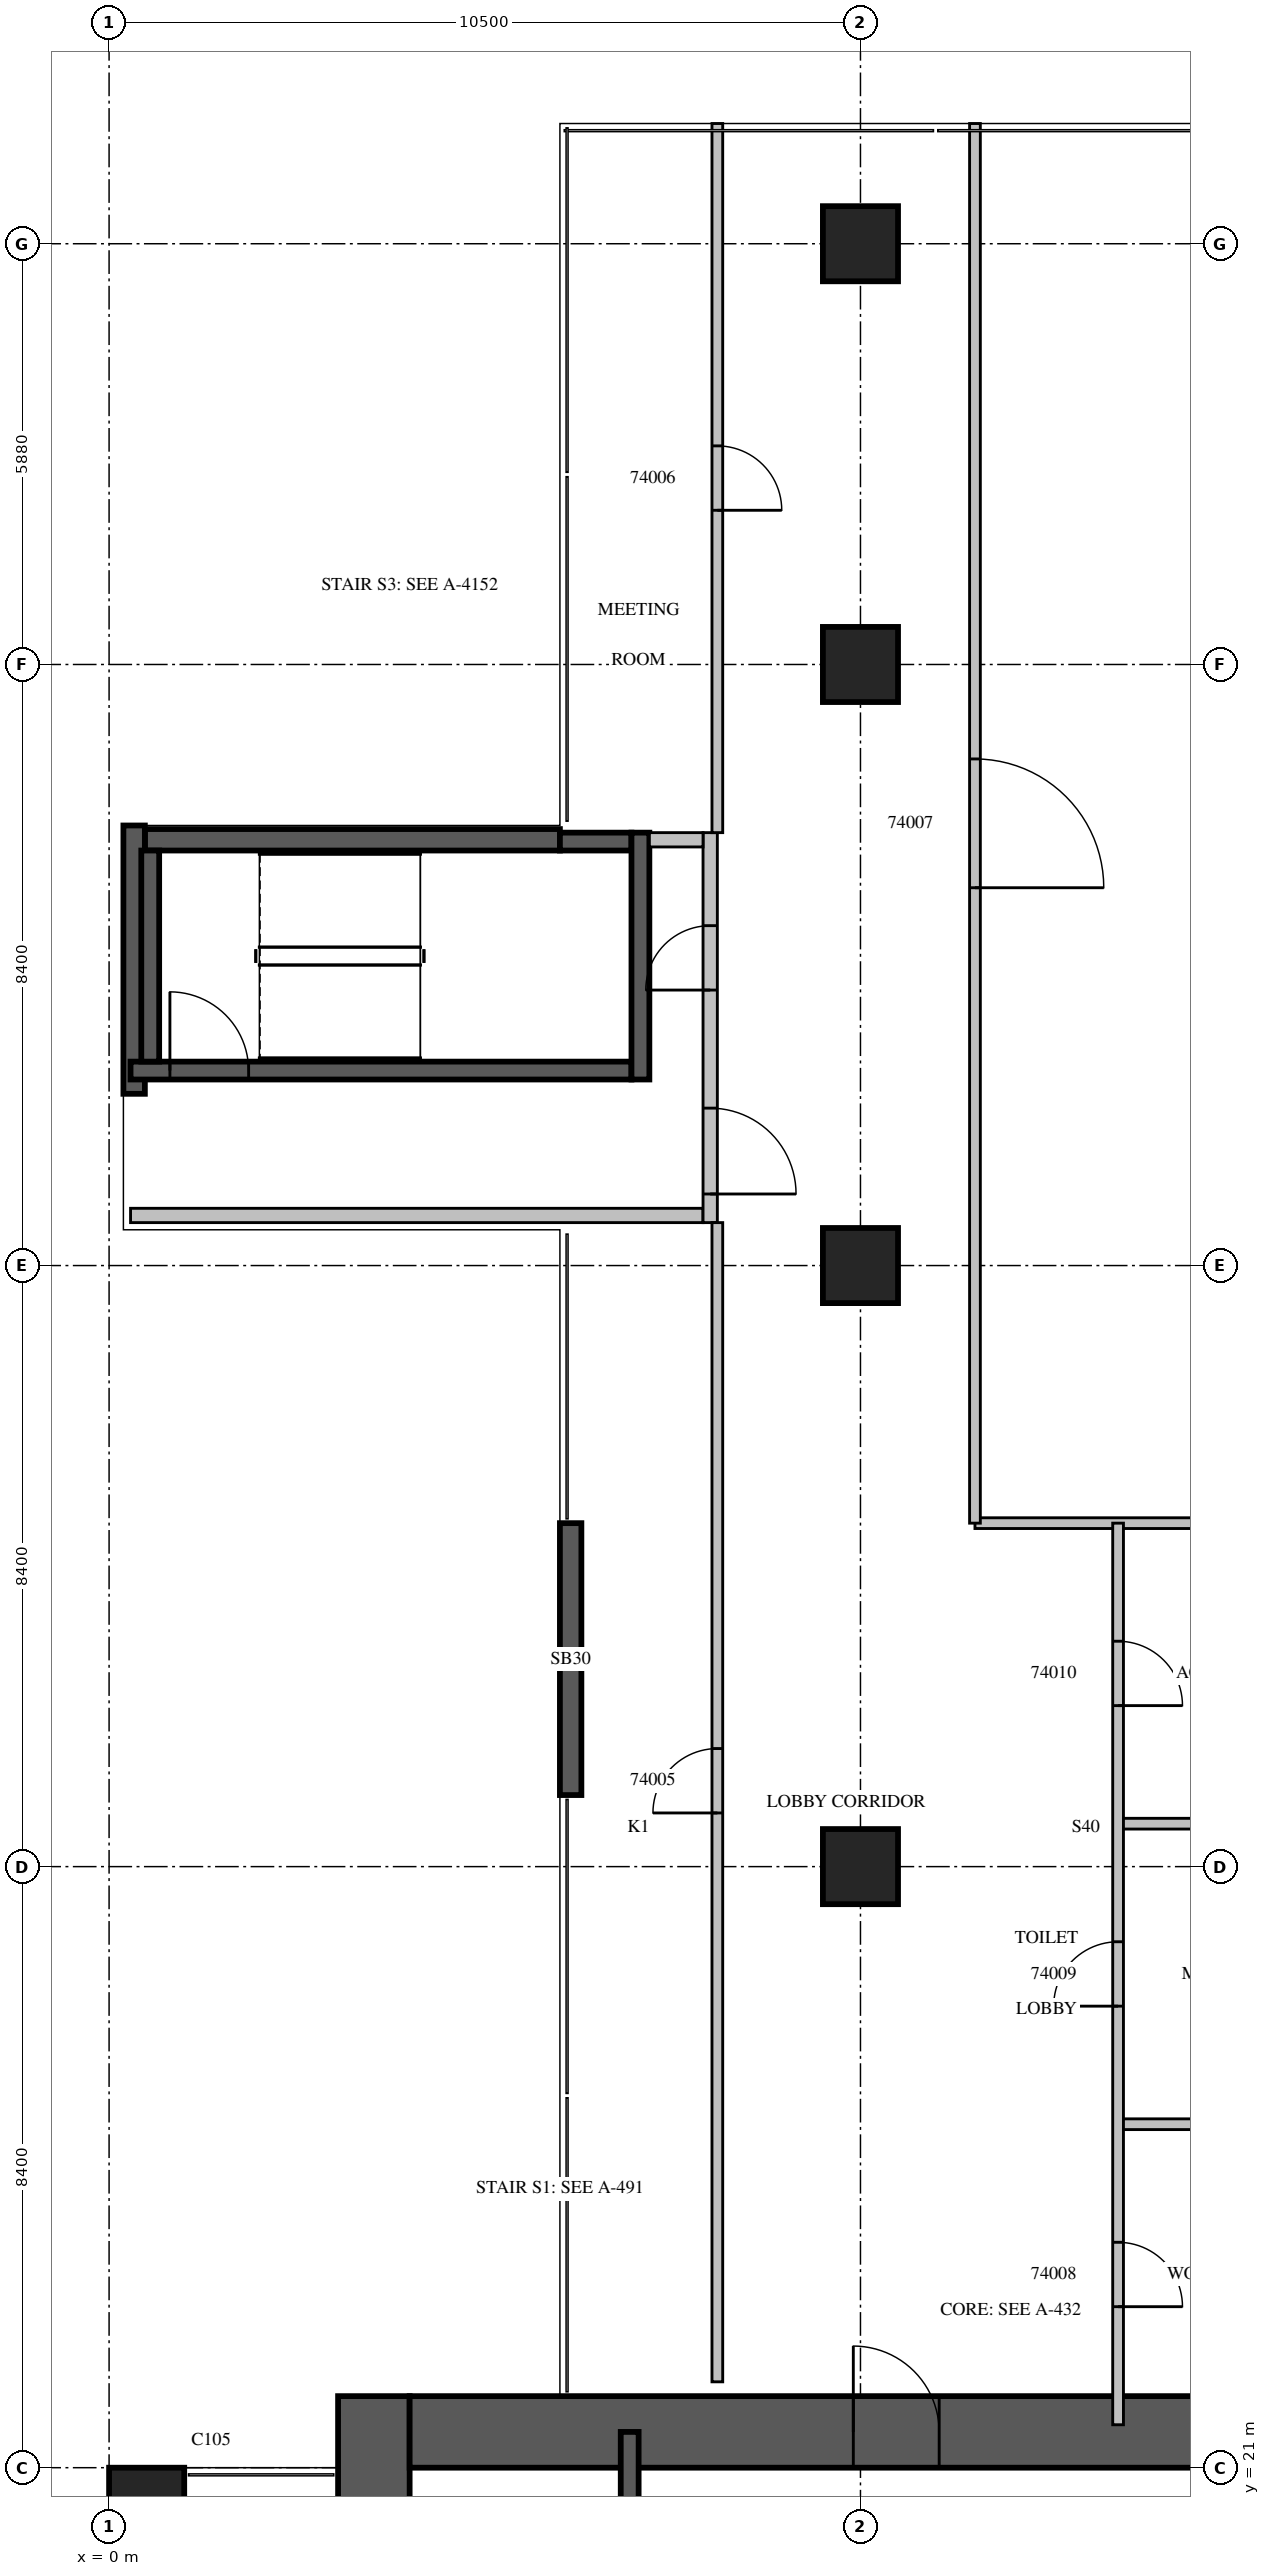
"""IFC4 building model, lengths in metres.
Left out: names, types, materials, properties, quantities, classifications, styles, units other than length and angle.
Written with IfcOpenShell. Run it as: python <this file> out.ifc"""

import sys

from ifc_helpers import new_model, si_unit, direction, frame, frame_2d, origin, origin_2d, place, context, subcontext, project, spatial, rectangle, extrude, source, transform, mapped, element, fill, save


model = new_model("IFC4")
c1 = context("Model", 3, precision=1e-05, world=origin(), true_north=direction((0.0, 1.0)))
c2 = subcontext(c1, "Body", "Model", "MODEL_VIEW")
j1 = project(units=[si_unit("LENGTHUNIT", "METRE"), si_unit("PLANEANGLEUNIT", "RADIAN")], contexts=[c1])
p1 = place(None, origin())
s1 = spatial("IfcSite", under=j1, at=p1, CompositionType="ELEMENT")
p2 = place(p1, origin())
s2 = spatial("IfcBuilding", under=s1, at=p2, CompositionType="ELEMENT")
p3 = place(p2, frame((0.0, 0.0, 170.3)))
s3 = spatial("IfcBuildingStorey", under=s2, at=p3, CompositionType="ELEMENT", Elevation=170.3)
m1 = source(origin(), c2, "Body", "SweptSolid", [
    extrude(rectangle(XDim=1.05, YDim=1.05, at=origin_2d()), origin(), (0.0, 0.0, 1.0), 7.5),
])
for number, where, z_axis, x_axis in (
    (1, (0.525, 20.475, 0.0), (0.0, 0.0, 1.0), (1.0, 0.0, 0.0)),
    (2, (10.5, 29.4, 0.0), (0.0, 0.0, 1.0), (1.0, 0.0, 0.0)),
    (3, (10.5, 37.8, 0.0), (0.0, 0.0, 1.0), (1.0, 0.0, 0.0)),
    (4, (10.5, 46.2, 0.0), (0.0, 0.0, 1.0), (1.0, 0.0, 0.0)),
    (5, (10.5, 52.08, 0.0), (0.0, 0.0, 1.0), (1.0, 0.0, 0.0)),
):
    element("IfcColumn", number, at=place(p3, frame(where, z_axis=z_axis, x_axis=x_axis)), inside=s3, PredefinedType="COLUMN", context=c2, shape_type="MappedRepresentation", body=[
        mapped(m1, transform((0.0, 0.0, 0.0), scale=1.0)),
    ])
p4 = place(p3, frame((3.7, 4.2, 0.0), z_axis=(0.0, 0.0, 1.0), x_axis=(0.0, 1.0, 0.0)))
e6 = element("IfcWall", 6, at=p4, inside=s3, PredefinedType="SHEAR", context=c2, shape_type="SweptSolid", body=[
    extrude(rectangle(XDim=17.8, YDim=1.0, at=frame_2d((8.9, 0.0))), origin(), (0.0, 0.0, 1.0), 7.5),
])
m2 = source(origin(), c2, "Body", "SweptSolid", [
    extrude(rectangle(XDim=2.2, YDim=2.1, at=frame_2d((1.1, 1.05))), frame((0.0, 0.51, 0.0), z_axis=(0.0, -1.0, 0.0), x_axis=(1.0, 0.0, 0.0)), (0.0, 0.0, 1.0), 1.02),
])
p5 = place(p4, frame((4.2, 0.0, 0.0)))
e7 = element("IfcOpeningElement", 7, at=p5, cuts=e6, PredefinedType="OPENING", context=c2, shape_type="MappedRepresentation", body=[
    mapped(m2, transform((0.0, 0.0, 0.0), scale=1.0)),
])
m3 = source(origin(), c2, "Body", "SweptSolid", [
    extrude(rectangle(XDim=16.8, YDim=1.0, at=frame_2d((8.4, 0.0))), origin(), (0.0, 0.0, 1.0), 7.5),
])
p6 = place(p3, frame((4.2, 21.5, 0.0), z_axis=(0.0, 0.0, 1.0), x_axis=(1.0, 0.0, 0.0)))
e8 = element("IfcWall", 8, at=p6, inside=s3, PredefinedType="SHEAR", context=c2, shape_type="MappedRepresentation", body=[
    mapped(m3, transform((0.0, 0.0, 0.0), scale=1.0)),
])
m4 = source(origin(), c2, "Body", "SweptSolid", [
    extrude(rectangle(XDim=1.2, YDim=2.1, at=frame_2d((0.6, 1.05))), frame((0.0, 0.51, 0.0), z_axis=(0.0, -1.0, 0.0), x_axis=(1.0, 0.0, 0.0)), (0.0, 0.0, 1.0), 1.02),
])
p7 = place(p6, frame((6.2, 0.0, 0.0)))
e9 = element("IfcOpeningElement", 9, at=p7, cuts=e8, PredefinedType="OPENING", context=c2, shape_type="MappedRepresentation", body=[
    mapped(m4, transform((0.0, 0.0, 0.0), scale=1.0)),
])
p8 = place(p3, frame((6.3, 43.75, 0.0), z_axis=(0.0, 0.0, 1.0), x_axis=(-1.0, 0.0, 0.0)))
e10 = element("IfcWall", 10, at=p8, inside=s3, PredefinedType="SOLIDWALL", context=c2, shape_type="SweptSolid", body=[
    extrude(rectangle(XDim=5.8, YDim=0.3, at=frame_2d((2.9, 0.0))), origin(), (0.0, 0.0, 1.0), 7.1),
])
p9 = place(p3, frame((0.35, 43.95, 0.0), z_axis=(0.0, 0.0, 1.0), x_axis=(0.0, -1.0, 0.0)))
e11 = element("IfcWall", 11, at=p9, inside=s3, PredefinedType="SOLIDWALL", context=c2, shape_type="SweptSolid", body=[
    extrude(rectangle(XDim=3.75, YDim=0.3, at=frame_2d((1.875, 0.0))), origin(), (0.0, 0.0, 1.0), 7.1),
])
p10 = place(p3, frame((6.45, 34.2, 0.0), z_axis=(0.0, 0.0, 1.0), x_axis=(0.0, -1.0, 0.0)))
e12 = element("IfcWall", 12, at=p10, inside=s3, PredefinedType="SOLIDWALL", context=c2, shape_type="SweptSolid", body=[
    extrude(rectangle(XDim=3.8, YDim=0.3, at=frame_2d((1.9, 0.0))), origin(), (0.0, 0.0, 1.0), 7.1),
])
p11 = place(p3, frame((7.275, 14.9, 0.0), z_axis=(0.0, 0.0, 1.0), x_axis=(0.0, 1.0, 0.0)))
e13 = element("IfcWall", 13, at=p11, inside=s3, PredefinedType="SOLIDWALL", context=c2, shape_type="SweptSolid", body=[
    extrude(rectangle(XDim=6.6, YDim=0.25, at=frame_2d((3.3, 0.0))), origin(), (0.0, 0.0, 1.0), 7.1),
])
m5 = source(origin(), c2, "Body", "SweptSolid", [
    extrude(rectangle(XDim=1.1, YDim=2.1, at=frame_2d((0.55, 1.05))), frame((0.0, 0.135, 0.0), z_axis=(0.0, -1.0, 0.0), x_axis=(1.0, 0.0, 0.0)), (0.0, 0.0, 1.0), 0.27),
])
p12 = place(p11, frame((0.15, 0.0, 0.0)))
e14 = element("IfcOpeningElement", 14, at=p12, cuts=e13, PredefinedType="OPENING", context=c2, shape_type="MappedRepresentation", body=[
    mapped(m5, transform((0.0, 0.0, 0.0), scale=1.0)),
])
m6 = source(origin(), c2, "Body", "SweptSolid", [
    extrude(rectangle(XDim=7.0, YDim=0.25, at=frame_2d((3.5, 0.0))), origin(), (0.0, 0.0, 1.0), 7.1),
])
p13 = place(p3, frame((0.3, 40.525, 0.0), z_axis=(0.0, 0.0, 1.0), x_axis=(1.0, 0.0, 0.0)))
e15 = element("IfcWall", 15, at=p13, inside=s3, PredefinedType="SOLIDWALL", context=c2, shape_type="MappedRepresentation", body=[
    mapped(m6, transform((0.0, 0.0, 0.0), scale=1.0)),
])
p14 = place(p13, frame((0.55, 0.0, 0.0)))
e16 = element("IfcOpeningElement", 16, at=p14, cuts=e15, PredefinedType="OPENING", context=c2, shape_type="MappedRepresentation", body=[
    mapped(m5, transform((0.0, 0.0, 0.0), scale=1.0)),
])
p15 = place(p3, frame((6.3, 43.725, 0.0), z_axis=(0.0, 0.0, 1.0), x_axis=(1.0, 0.0, 0.0)))
e17 = element("IfcWall", 17, at=p15, inside=s3, PredefinedType="SOLIDWALL", context=c2, shape_type="SweptSolid", body=[
    extrude(rectangle(XDim=1.0, YDim=0.25, at=frame_2d((0.5, 0.0))), origin(), (0.0, 0.0, 1.0), 7.1),
])
m7 = source(origin(), c2, "Body", "SweptSolid", [
    extrude(rectangle(XDim=3.45, YDim=0.25, at=frame_2d((1.725, 0.0))), origin(), (0.0, 0.0, 1.0), 7.1),
])
p16 = place(p3, frame((7.425, 40.4, 0.0), z_axis=(0.0, 0.0, 1.0), x_axis=(0.0, 1.0, 0.0)))
e18 = element("IfcWall", 18, at=p16, inside=s3, PredefinedType="SOLIDWALL", context=c2, shape_type="MappedRepresentation", body=[
    mapped(m7, transform((0.0, 0.0, 0.0), scale=1.0)),
])
m8 = source(origin(), c2, "Body", "SweptSolid", [
    extrude(rectangle(XDim=2.95, YDim=0.25, at=frame_2d((1.475, 0.0))), origin(), (0.0, 0.0, 1.0), 7.1),
])
p17 = place(p3, frame((0.575, 40.65, 0.0), z_axis=(0.0, 0.0, 1.0), x_axis=(0.0, 1.0, 0.0)))
e19 = element("IfcWall", 19, at=p17, inside=s3, PredefinedType="SOLIDWALL", context=c2, shape_type="MappedRepresentation", body=[
    mapped(m8, transform((0.0, 0.0, 0.0), scale=1.0)),
])
m9 = source(origin(), c2, "Body", "SweptSolid", [
    extrude(rectangle(XDim=8.0, YDim=0.2, at=frame_2d((4.0, 0.0))), origin(), (0.0, 0.0, 1.0), 7.1),
])
p18 = place(p3, frame((0.3, 38.5, 0.0), z_axis=(0.0, 0.0, 1.0), x_axis=(1.0, 0.0, 0.0)))
e20 = element("IfcWall", 20, at=p18, inside=s3, PredefinedType="PARTITIONING", context=c2, shape_type="MappedRepresentation", body=[
    mapped(m9, transform((0.0, 0.0, 0.0), scale=1.0)),
])
m10 = source(origin(), c2, "Body", "SweptSolid", [
    extrude(rectangle(XDim=5.45, YDim=0.2, at=frame_2d((2.725, 0.0))), origin(), (0.0, 0.0, 1.0), 7.1),
])
p19 = place(p3, frame((8.4, 38.4, 0.0), z_axis=(0.0, 0.0, 1.0), x_axis=(0.0, 1.0, 0.0)))
e21 = element("IfcWall", 21, at=p19, inside=s3, PredefinedType="PARTITIONING", context=c2, shape_type="MappedRepresentation", body=[
    mapped(m10, transform((0.0, 0.0, 0.0), scale=1.0)),
])
m11 = source(origin(), c2, "Body", "SweptSolid", [
    extrude(rectangle(XDim=1.2, YDim=2.1, at=frame_2d((0.6, 1.05))), frame((0.0, 0.11, 0.0), z_axis=(0.0, -1.0, 0.0), x_axis=(1.0, 0.0, 0.0)), (0.0, 0.0, 1.0), 0.22),
])
p20 = place(p19, frame((0.4, 0.0, 0.0)))
e22 = element("IfcOpeningElement", 22, at=p20, cuts=e21, PredefinedType="OPENING", context=c2, shape_type="MappedRepresentation", body=[
    mapped(m11, transform((0.0, 0.0, 0.0), scale=1.0)),
])
m12 = source(origin(), c2, "Body", "SweptSolid", [
    extrude(rectangle(XDim=0.9, YDim=2.1, at=frame_2d((0.45, 1.05))), frame((0.0, 0.11, 0.0), z_axis=(0.0, -1.0, 0.0), x_axis=(1.0, 0.0, 0.0)), (0.0, 0.0, 1.0), 0.22),
])
p21 = place(p19, frame((3.25, 0.0, 0.0)))
e23 = element("IfcOpeningElement", 23, at=p21, cuts=e21, PredefinedType="OPENING", context=c2, shape_type="MappedRepresentation", body=[
    mapped(m12, transform((0.0, 0.0, 0.0), scale=1.0)),
])
m13 = source(origin(), c2, "Body", "SweptSolid", [
    extrude(rectangle(XDim=0.75, YDim=0.2, at=frame_2d((0.375, 0.0))), origin(), (0.0, 0.0, 1.0), 7.1),
])
p22 = place(p3, frame((7.55, 43.75, 0.0), z_axis=(0.0, 0.0, 1.0), x_axis=(1.0, 0.0, 0.0)))
e24 = element("IfcWall", 24, at=p22, inside=s3, PredefinedType="PARTITIONING", context=c2, shape_type="MappedRepresentation", body=[
    mapped(m13, transform((0.0, 0.0, 0.0), scale=1.0)),
])
p23 = place(p3, frame((14.1, 25.8, 0.0), z_axis=(0.0, 0.0, 1.0), x_axis=(1.0, 0.0, 0.0)))
e25 = element("IfcWall", 25, at=p23, inside=s3, PredefinedType="PARTITIONING", context=c2, shape_type="SweptSolid", body=[
    extrude(rectangle(XDim=3.0, YDim=0.15, at=frame_2d((1.5, 0.0))), origin(), (0.0, 0.0, 1.0), 7.1),
])
m14 = source(origin(), c2, "Body", "SweptSolid", [
    extrude(rectangle(XDim=3.0, YDim=0.15, at=frame_2d((1.5, 0.0))), origin(), (0.0, 0.0, 1.0), 7.1),
])
p24 = place(p3, frame((14.1, 30.0, 0.0), z_axis=(0.0, 0.0, 1.0), x_axis=(1.0, 0.0, 0.0)))
e26 = element("IfcWall", 26, at=p24, inside=s3, PredefinedType="PARTITIONING", context=c2, shape_type="MappedRepresentation", body=[
    mapped(m14, transform((0.0, 0.0, 0.0), scale=1.0)),
])
p25 = place(p3, frame((12.1, 34.2, 0.0), z_axis=(0.0, 0.0, 1.0), x_axis=(1.0, 0.0, 0.0)))
e27 = element("IfcWall", 27, at=p25, inside=s3, PredefinedType="PARTITIONING", context=c2, shape_type="SweptSolid", body=[
    extrude(rectangle(XDim=5.0, YDim=0.15, at=frame_2d((2.5, 0.0))), origin(), (0.0, 0.0, 1.0), 7.1),
])
m15 = source(origin(), c2, "Body", "SweptSolid", [
    extrude(rectangle(XDim=16.2, YDim=0.15, at=frame_2d((8.1, 0.0))), origin(), (0.0, 0.0, 1.0), 7.1),
])
p26 = place(p3, frame((8.5, 22.2, 0.0), z_axis=(0.0, 0.0, 1.0), x_axis=(0.0, 1.0, 0.0)))
e28 = element("IfcWall", 28, at=p26, inside=s3, PredefinedType="PARTITIONING", context=c2, shape_type="MappedRepresentation", body=[
    mapped(m15, transform((0.0, 0.0, 0.0), scale=1.0)),
])
m16 = source(origin(), c2, "Body", "SweptSolid", [
    extrude(rectangle(XDim=0.9, YDim=2.1, at=frame_2d((0.45, 1.05))), frame((0.0, 0.085, 0.0), z_axis=(0.0, -1.0, 0.0), x_axis=(1.0, 0.0, 0.0)), (0.0, 0.0, 1.0), 0.17),
])
p27 = place(p26, frame((7.95, 0.0, 0.0)))
e29 = element("IfcOpeningElement", 29, at=p27, cuts=e28, PredefinedType="OPENING", context=c2, shape_type="MappedRepresentation", body=[
    mapped(m16, transform((0.0, 0.0, 0.0), scale=1.0)),
])
p28 = place(p3, frame((8.5, 43.85, 0.0), z_axis=(0.0, 0.0, 1.0), x_axis=(0.0, 1.0, 0.0)))
e30 = element("IfcWall", 30, at=p28, inside=s3, PredefinedType="PARTITIONING", context=c2, shape_type="SweptSolid", body=[
    extrude(rectangle(XDim=9.91, YDim=0.15, at=frame_2d((4.955, 0.0))), origin(), (0.0, 0.0, 1.0), 7.1),
])
p29 = place(p28, frame((4.505, 0.0, 0.0)))
e31 = element("IfcOpeningElement", 31, at=p29, cuts=e30, PredefinedType="OPENING", context=c2, shape_type="MappedRepresentation", body=[
    mapped(m16, transform((0.0, 0.0, 0.0), scale=1.0)),
])
p30 = place(p3, frame((12.1, 34.2, 0.0), z_axis=(0.0, 0.0, 1.0), x_axis=(0.0, 1.0, 0.0)))
e32 = element("IfcWall", 32, at=p30, inside=s3, PredefinedType="PARTITIONING", context=c2, shape_type="SweptSolid", body=[
    extrude(rectangle(XDim=19.56, YDim=0.15, at=frame_2d((9.78, 0.0))), origin(), (0.0, 0.0, 1.0), 7.1),
])
m17 = source(origin(), c2, "Body", "SweptSolid", [
    extrude(rectangle(XDim=1.8, YDim=2.1, at=frame_2d((0.9, 1.05))), frame((0.0, 0.085, 0.0), z_axis=(0.0, -1.0, 0.0), x_axis=(1.0, 0.0, 0.0)), (0.0, 0.0, 1.0), 0.17),
])
p31 = place(p30, frame((8.88, 0.0, 0.0)))
e33 = element("IfcOpeningElement", 33, at=p31, cuts=e32, PredefinedType="OPENING", context=c2, shape_type="MappedRepresentation", body=[
    mapped(m17, transform((0.0, 0.0, 0.0), scale=1.0)),
])
p32 = place(p3, frame((14.1, 21.6, 0.0), z_axis=(0.0, 0.0, 1.0), x_axis=(0.0, 1.0, 0.0)))
e34 = element("IfcWall", 34, at=p32, inside=s3, PredefinedType="PARTITIONING", context=c2, shape_type="SweptSolid", body=[
    extrude(rectangle(XDim=12.6, YDim=0.15, at=frame_2d((6.3, 0.0))), origin(), (0.0, 0.0, 1.0), 7.1),
])
p33 = place(p32, frame((1.65, 0.0, 0.0)))
e35 = element("IfcOpeningElement", 35, at=p33, cuts=e34, PredefinedType="OPENING", context=c2, shape_type="MappedRepresentation", body=[
    mapped(m16, transform((0.0, 0.0, 0.0), scale=1.0)),
])
p34 = place(p32, frame((5.85, 0.0, 0.0)))
e36 = element("IfcOpeningElement", 36, at=p34, cuts=e34, PredefinedType="OPENING", context=c2, shape_type="MappedRepresentation", body=[
    mapped(m16, transform((0.0, 0.0, 0.0), scale=1.0)),
])
p35 = place(p32, frame((10.05, 0.0, 0.0)))
e37 = element("IfcOpeningElement", 37, at=p35, cuts=e34, PredefinedType="OPENING", context=c2, shape_type="MappedRepresentation", body=[
    mapped(m16, transform((0.0, 0.0, 0.0), scale=1.0)),
])
m18 = source(origin(), c2, "Body", "SweptSolid", [
    extrude(rectangle(XDim=1.1, YDim=2.1, at=frame_2d((0.55, 1.05))), frame((0.0, 0.025, 0.0), z_axis=(0.0, -1.0, 0.0), x_axis=(1.0, 0.0, 0.0)), (0.0, 0.0, 1.0), 0.05),
])
p36 = place(p14, origin())
e38 = element("IfcDoor", 38, at=p36, inside=s3, OperationType="SINGLE_SWING_LEFT", PredefinedType="DOOR", context=c2, shape_type="MappedRepresentation", body=[
    mapped(m18, transform((0.0, 0.0, 0.0), scale=1.0)),
])
fill(e16, e38)
m19 = source(origin(), c2, "Body", "SweptSolid", [
    extrude(rectangle(XDim=1.2, YDim=2.1, at=frame_2d((0.6, 1.05))), frame((0.0, 0.025, 0.0), z_axis=(0.0, -1.0, 0.0), x_axis=(1.0, 0.0, 0.0)), (0.0, 0.0, 1.0), 0.05),
])
p37 = place(p20, origin())
e39 = element("IfcDoor", 39, at=p37, inside=s3, OperationType="SINGLE_SWING_RIGHT", PredefinedType="DOOR", context=c2, shape_type="MappedRepresentation", body=[
    mapped(m19, transform((0.0, 0.0, 0.0), scale=1.0)),
])
fill(e22, e39)
m20 = source(origin(), c2, "Body", "SweptSolid", [
    extrude(rectangle(XDim=0.9, YDim=2.1, at=frame_2d((0.45, 1.05))), frame((0.0, 0.025, 0.0), z_axis=(0.0, -1.0, 0.0), x_axis=(1.0, 0.0, 0.0)), (0.0, 0.0, 1.0), 0.05),
])
p38 = place(p21, origin())
e40 = element("IfcDoor", 40, at=p38, inside=s3, OperationType="SINGLE_SWING_LEFT", PredefinedType="DOOR", context=c2, shape_type="MappedRepresentation", body=[
    mapped(m20, transform((0.0, 0.0, 0.0), scale=1.0)),
])
fill(e23, e40)
p39 = place(p7, origin())
e41 = element("IfcDoor", 41, at=p39, inside=s3, OperationType="SINGLE_SWING_LEFT", PredefinedType="DOOR", context=c2, shape_type="MappedRepresentation", body=[
    mapped(m19, transform((0.0, 0.0, 0.0), scale=1.0)),
])
fill(e9, e41)
p40 = place(p27, origin())
e42 = element("IfcDoor", 42, at=p40, inside=s3, OperationType="SINGLE_SWING_LEFT", PredefinedType="DOOR", context=c2, shape_type="MappedRepresentation", body=[
    mapped(m20, transform((0.0, 0.0, 0.0), scale=1.0)),
])
fill(e29, e42)
p41 = place(p29, origin())
e43 = element("IfcDoor", 43, at=p41, inside=s3, OperationType="SINGLE_SWING_RIGHT", PredefinedType="DOOR", context=c2, shape_type="MappedRepresentation", body=[
    mapped(m20, transform((0.0, 0.0, 0.0), scale=1.0)),
])
fill(e31, e43)
m21 = source(origin(), c2, "Body", "SweptSolid", [
    extrude(rectangle(XDim=1.8, YDim=2.1, at=frame_2d((0.9, 1.05))), frame((0.0, 0.025, 0.0), z_axis=(0.0, -1.0, 0.0), x_axis=(1.0, 0.0, 0.0)), (0.0, 0.0, 1.0), 0.05),
])
p42 = place(p31, origin())
e44 = element("IfcDoor", 44, at=p42, inside=s3, OperationType="DOUBLE_DOOR_SINGLE_SWING", PredefinedType="DOOR", context=c2, shape_type="MappedRepresentation", body=[
    mapped(m21, transform((0.0, 0.0, 0.0), scale=1.0)),
])
fill(e33, e44)
p43 = place(p33, origin())
e45 = element("IfcDoor", 45, at=p43, inside=s3, OperationType="SINGLE_SWING_RIGHT", PredefinedType="DOOR", context=c2, shape_type="MappedRepresentation", body=[
    mapped(m20, transform((0.0, 0.0, 0.0), scale=1.0)),
])
fill(e35, e45)
p44 = place(p34, origin())
e46 = element("IfcDoor", 46, at=p44, inside=s3, OperationType="SINGLE_SWING_LEFT", PredefinedType="DOOR", context=c2, shape_type="MappedRepresentation", body=[
    mapped(m20, transform((0.0, 0.0, 0.0), scale=1.0)),
])
fill(e36, e46)
p45 = place(p35, origin())
e47 = element("IfcDoor", 47, at=p45, inside=s3, OperationType="SINGLE_SWING_RIGHT", PredefinedType="DOOR", context=c2, shape_type="MappedRepresentation", body=[
    mapped(m20, transform((0.0, 0.0, 0.0), scale=1.0)),
])
fill(e37, e47)
save(model, sys.argv[1])
